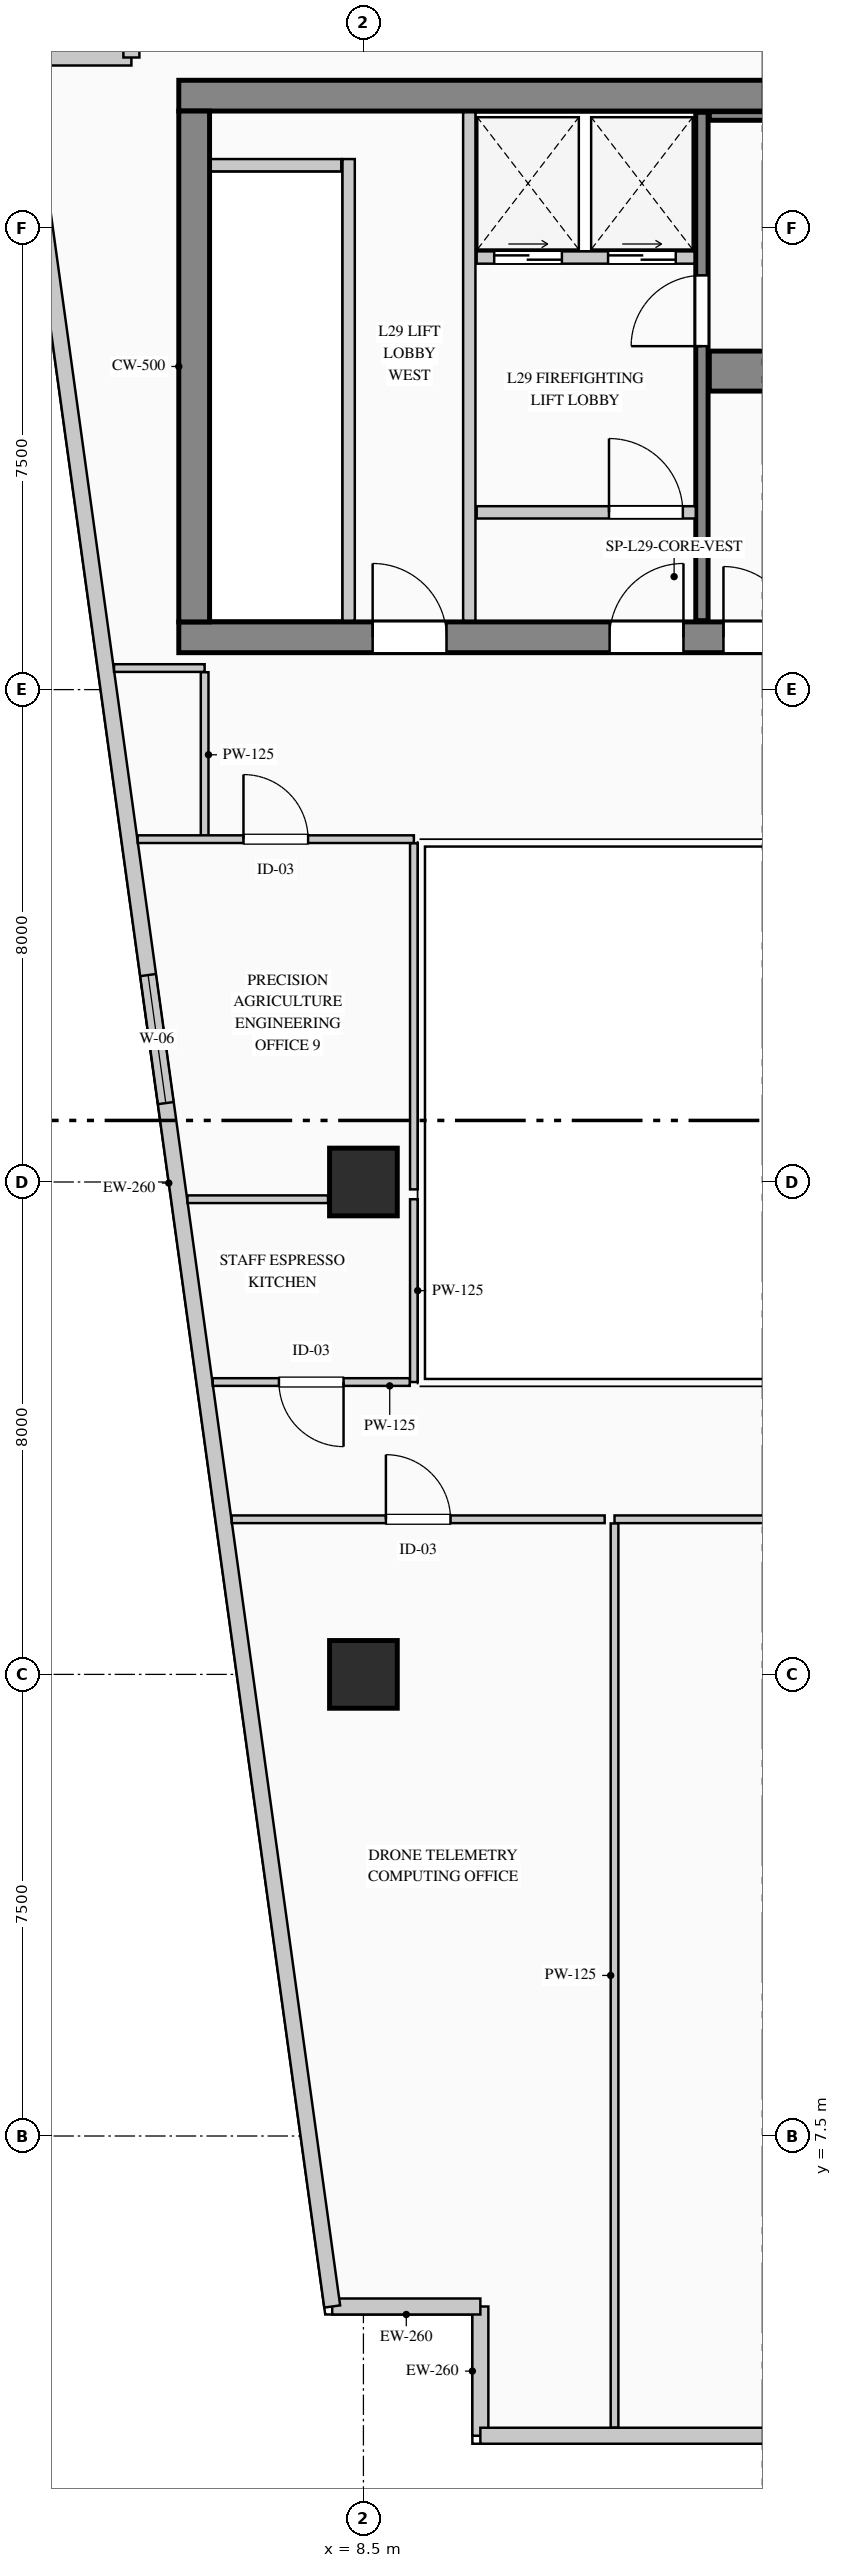
"""IFC4 building model, lengths in metres.
Left out: names, types, materials, properties, quantities, classifications, styles, units other than length and angle.
Written with IfcOpenShell. Run it as: python <this file> out.ifc"""

import sys

from ifc_helpers import new_model, si_unit, direction, frame, frame_2d, origin, origin_2d, place, context, subcontext, project, spatial, rectangle, extrude, element, fill, save


model = new_model("IFC4")
c1 = context("Model", 3, precision=1e-05, world=origin(), true_north=direction((0.0, 1.0)))
c2 = subcontext(c1, "Body", "Model", "MODEL_VIEW")
j1 = project(units=[si_unit("LENGTHUNIT", "METRE"), si_unit("PLANEANGLEUNIT", "RADIAN")], contexts=[c1])
p1 = place(None, origin())
s1 = spatial("IfcSite", under=j1, at=p1, CompositionType="ELEMENT")
p2 = place(p1, origin())
s2 = spatial("IfcBuilding", under=s1, at=p2, CompositionType="ELEMENT")
p3 = place(p2, frame((0.0, 0.0, 127.2)))
s3 = spatial("IfcBuildingStorey", under=s2, at=p3, CompositionType="ELEMENT", Elevation=127.2)
p4 = place(p3, frame((5.5, 40.65, 0.0), z_axis=(0.0, 0.0, 1.0), x_axis=(1.0, 0.0, 0.0)))
e1 = element("IfcWall", 1, at=p4, inside=s3, PredefinedType="SHEAR", context=c2, shape_type="SweptSolid", body=[
    extrude(rectangle(XDim=17.85, YDim=0.5, at=frame_2d((8.925, 0.0))), origin(), (0.0, 0.0, 1.0), 3.95),
])
p5 = place(p4, frame((15.945, 0.0, 0.0)))
e2 = element("IfcOpeningElement", 2, at=p5, cuts=e1, PredefinedType="OPENING", context=c2, shape_type="SweptSolid", body=[
    extrude(rectangle(XDim=1.18, YDim=2.25, at=frame_2d((0.59, 1.125))), frame((0.0, 0.26, 0.0), z_axis=(0.0, -1.0, 0.0), x_axis=(1.0, 0.0, 0.0)), (0.0, 0.0, 1.0), 0.52),
])
p6 = place(p3, frame((5.5, 31.85, 0.0), z_axis=(0.0, 0.0, 1.0), x_axis=(1.0, 0.0, 0.0)))
e3 = element("IfcWall", 3, at=p6, inside=s3, PredefinedType="SHEAR", context=c2, shape_type="SweptSolid", body=[
    extrude(rectangle(XDim=17.85, YDim=0.5, at=frame_2d((8.925, 0.0))), origin(), (0.0, 0.0, 1.0), 3.95),
])
p7 = place(p6, frame((3.15, 0.0, 0.0)))
e4 = element("IfcOpeningElement", 4, at=p7, cuts=e3, PredefinedType="OPENING", context=c2, shape_type="SweptSolid", body=[
    extrude(rectangle(XDim=1.2, YDim=2.2, at=frame_2d((0.6, 1.1))), frame((0.0, 0.26, 0.0), z_axis=(0.0, -1.0, 0.0), x_axis=(1.0, 0.0, 0.0)), (0.0, 0.0, 1.0), 0.52),
])
p8 = place(p6, frame((7.0, 0.0, 0.0)))
e5 = element("IfcOpeningElement", 5, at=p8, cuts=e3, PredefinedType="OPENING", context=c2, shape_type="SweptSolid", body=[
    extrude(rectangle(XDim=1.2, YDim=2.2, at=frame_2d((0.6, 1.1))), frame((0.0, 0.26, 0.0), z_axis=(0.0, -1.0, 0.0), x_axis=(1.0, 0.0, 0.0)), (0.0, 0.0, 1.0), 0.52),
])
p9 = place(p6, frame((8.85, 0.0, 0.0)))
e6 = element("IfcOpeningElement", 6, at=p9, cuts=e3, PredefinedType="OPENING", context=c2, shape_type="SweptSolid", body=[
    extrude(rectangle(XDim=1.15, YDim=2.2, at=frame_2d((0.575, 1.1))), frame((0.0, 0.26, 0.0), z_axis=(0.0, -1.0, 0.0), x_axis=(1.0, 0.0, 0.0)), (0.0, 0.0, 1.0), 0.52),
])
p10 = place(p6, frame((15.95, 0.0, 0.0)))
e7 = element("IfcOpeningElement", 7, at=p10, cuts=e3, PredefinedType="OPENING", context=c2, shape_type="SweptSolid", body=[
    extrude(rectangle(XDim=1.2, YDim=2.2, at=frame_2d((0.6, 1.1))), frame((0.0, 0.26, 0.0), z_axis=(0.0, -1.0, 0.0), x_axis=(1.0, 0.0, 0.0)), (0.0, 0.0, 1.0), 0.52),
])
p11 = place(p3, frame((5.75, 32.1, 0.0), z_axis=(0.0, 0.0, 1.0), x_axis=(0.0, 1.0, 0.0)))
e8 = element("IfcWall", 8, at=p11, inside=s3, PredefinedType="SHEAR", context=c2, shape_type="SweptSolid", body=[
    extrude(rectangle(XDim=8.3, YDim=0.5, at=frame_2d((4.15, 0.0))), origin(), (0.0, 0.0, 1.0), 3.95),
])
p12 = place(p3, frame((14.0, 32.12, 0.0), z_axis=(0.0, 0.0, 1.0), x_axis=(0.0, 1.0, 0.0)))
e9 = element("IfcWall", 9, at=p12, inside=s3, PredefinedType="SHEAR", context=c2, shape_type="SweptSolid", body=[
    extrude(rectangle(XDim=8.26, YDim=0.2, at=frame_2d((4.13, 0.0))), origin(), (0.0, 0.0, 1.0), 3.95),
])
p13 = place(p12, frame((4.46, 0.0, 0.0)))
e10 = element("IfcOpeningElement", 10, at=p13, cuts=e9, PredefinedType="OPENING", context=c2, shape_type="SweptSolid", body=[
    extrude(rectangle(XDim=1.15, YDim=2.2, at=frame_2d((0.575, 1.1))), frame((0.0, 0.11, 0.0), z_axis=(0.0, -1.0, 0.0), x_axis=(1.0, 0.0, 0.0)), (0.0, 0.0, 1.0), 0.22),
])
p14 = place(p3, frame((14.12, 36.175, 0.0), z_axis=(0.0, 0.0, 1.0), x_axis=(1.0, 0.0, 0.0)))
e11 = element("IfcWall", 11, at=p14, inside=s3, PredefinedType="SHEAR", context=c2, shape_type="SweptSolid", body=[
    extrude(rectangle(XDim=7.01, YDim=0.65, at=frame_2d((3.505, 0.0))), origin(), (0.0, 0.0, 1.0), 3.95),
])
p15 = place(p3, frame((14.12, 40.32, 0.0), z_axis=(0.0, 0.0, 1.0), x_axis=(1.0, 0.0, 0.0)))
e12 = element("IfcWall", 12, at=p15, inside=s3, PredefinedType="SHEAR", context=c2, shape_type="SweptSolid", body=[
    extrude(rectangle(XDim=7.01, YDim=0.14, at=frame_2d((3.505, 0.0))), origin(), (0.0, 0.0, 1.0), 3.95),
])
for number, where, z_axis, x_axis in (
    (13, (8.5, 15.0, 0.0), (0.0, 0.0, 1.0), (1.0, 0.0, 0.0)),
    (14, (8.5, 23.0, 0.0), (0.0, 0.0, 1.0), (1.0, 0.0, 0.0)),
):
    element("IfcColumn", number, at=place(p3, frame(where, z_axis=z_axis, x_axis=x_axis)), inside=s3, PredefinedType="COLUMN", context=c2, shape_type="SweptSolid", body=[
        extrude(rectangle(XDim=1.1, YDim=1.1, at=origin_2d()), origin(), (0.0, 0.0, 1.0), 3.95),
    ])
p16 = place(p3, frame((10.4, 2.63, 0.0), z_axis=(0.0, 0.0, 1.0), x_axis=(0.0, 1.0, 0.0)))
e15 = element("IfcWall", 15, at=p16, inside=s3, PredefinedType="STANDARD", context=c2, shape_type="SweptSolid", body=[
    extrude(rectangle(XDim=2.1, YDim=0.26, at=frame_2d((1.05, 0.0))), origin(), (0.0, 0.0, 1.0), 3.69),
])
p17 = place(p3, frame((10.4, 4.73, 0.0), z_axis=(0.0, 0.0, 1.0), x_axis=(-1.0, 0.0, 0.0)))
e16 = element("IfcWall", 16, at=p17, inside=s3, PredefinedType="STANDARD", context=c2, shape_type="SweptSolid", body=[
    extrude(rectangle(XDim=2.407, YDim=0.26, at=frame_2d((1.204, 0.0))), origin(), (0.0, 0.0, 1.0), 3.69),
])
p18 = place(p3, frame((7.993, 4.73, 0.0), z_axis=(0.0, 0.0, 1.0), x_axis=(-0.136989009016, 0.990572567462, 0.0)))
e17 = element("IfcWall", 17, at=p18, inside=s3, PredefinedType="STANDARD", context=c2, shape_type="SweptSolid", body=[
    extrude(rectangle(XDim=36.888, YDim=0.26, at=frame_2d((18.444, 0.0))), origin(), (0.0, 0.0, 1.0), 3.69),
])
p19 = place(p18, frame((19.738, 0.0, 0.9)))
e18 = element("IfcOpeningElement", 18, at=p19, cuts=e17, PredefinedType="OPENING", context=c2, shape_type="SweptSolid", body=[
    extrude(rectangle(XDim=2.1, YDim=2.0, at=frame_2d((1.05, 1.0))), frame((0.0, 0.14, 0.0), z_axis=(0.0, -1.0, 0.0), x_axis=(1.0, 0.0, 0.0)), (0.0, 0.0, 1.0), 0.28),
])
p20 = place(p3, frame((2.94, 41.27, 0.0), z_axis=(0.0, 0.0, 1.0), x_axis=(1.0, 0.0, 0.0)))
e19 = element("IfcWall", 19, at=p20, inside=s3, PredefinedType="STANDARD", context=c2, shape_type="SweptSolid", body=[
    extrude(rectangle(XDim=1.79, YDim=0.26, at=frame_2d((0.895, 0.0))), origin(), (0.0, 0.0, 1.0), 3.69),
])
p21 = place(p3, frame((4.73, 41.27, 0.0), z_axis=(0.0, 0.0, 1.0), x_axis=(0.0, 1.0, 0.0)))
e20 = element("IfcWall", 20, at=p21, inside=s3, PredefinedType="STANDARD", context=c2, shape_type="SweptSolid", body=[
    extrude(rectangle(XDim=2.1, YDim=0.26, at=frame_2d((1.05, 0.0))), origin(), (0.0, 0.0, 1.0), 3.69),
])
p22 = place(p3, frame((24.11, 2.63, 0.0), z_axis=(0.0, 0.0, 1.0), x_axis=(-1.0, 0.0, 0.0)))
e21 = element("IfcWall", 21, at=p22, inside=s3, PredefinedType="STANDARD", context=c2, shape_type="SweptSolid", body=[
    extrude(rectangle(XDim=13.71, YDim=0.26, at=frame_2d((6.855, 0.0))), origin(), (0.0, 0.0, 1.0), 3.69),
])
p23 = place(p22, frame((3.886, 0.0, 0.9)))
e22 = element("IfcOpeningElement", 22, at=p23, cuts=e21, PredefinedType="OPENING", context=c2, shape_type="SweptSolid", body=[
    extrude(rectangle(XDim=2.1, YDim=2.0, at=frame_2d((1.05, 1.0))), frame((0.0, 0.14, 0.0), z_axis=(0.0, -1.0, 0.0), x_axis=(1.0, 0.0, 0.0)), (0.0, 0.0, 1.0), 0.28),
])
p24 = place(p3, frame((8.26, 32.12, 0.0), z_axis=(0.0, 0.0, 1.0), x_axis=(0.0, 1.0, 0.0)))
e23 = element("IfcWall", 23, at=p24, inside=s3, PredefinedType="PARTITIONING", context=c2, shape_type="SweptSolid", body=[
    extrude(rectangle(XDim=7.5, YDim=0.2, at=frame_2d((3.75, 0.0))), origin(), (0.0, 0.0, 1.0), 3.69),
])
p25 = place(p3, frame((6.02, 39.52, 0.0), z_axis=(0.0, 0.0, 1.0), x_axis=(1.0, 0.0, 0.0)))
e24 = element("IfcWall", 24, at=p25, inside=s3, PredefinedType="PARTITIONING", context=c2, shape_type="SweptSolid", body=[
    extrude(rectangle(XDim=2.12, YDim=0.2, at=frame_2d((1.06, 0.0))), origin(), (0.0, 0.0, 1.0), 3.69),
])
p26 = place(p3, frame((10.22, 32.12, 0.0), z_axis=(0.0, 0.0, 1.0), x_axis=(0.0, 1.0, 0.0)))
e25 = element("IfcWall", 25, at=p26, inside=s3, PredefinedType="PARTITIONING", context=c2, shape_type="SweptSolid", body=[
    extrude(rectangle(XDim=8.26, YDim=0.2, at=frame_2d((4.13, 0.0))), origin(), (0.0, 0.0, 1.0), 3.69),
])
p27 = place(p3, frame((10.34, 38.02, 0.0), z_axis=(0.0, 0.0, 1.0), x_axis=(1.0, 0.0, 0.0)))
e26 = element("IfcWall", 26, at=p27, inside=s3, PredefinedType="PARTITIONING", context=c2, shape_type="SweptSolid", body=[
    extrude(rectangle(XDim=3.54, YDim=0.2, at=frame_2d((1.77, 0.0))), origin(), (0.0, 0.0, 1.0), 3.69),
])
p28 = place(p27, frame((0.285, 0.0, 0.0)))
e27 = element("IfcOpeningElement", 27, at=p28, cuts=e26, PredefinedType="OPENING", context=c2, shape_type="SweptSolid", body=[
    extrude(rectangle(XDim=1.1, YDim=2.2, at=frame_2d((0.55, 1.1))), frame((0.0, 0.11, 0.0), z_axis=(0.0, -1.0, 0.0), x_axis=(1.0, 0.0, 0.0)), (0.0, 0.0, 1.0), 0.22),
])
p29 = place(p27, frame((2.135, 0.0, 0.0)))
e28 = element("IfcOpeningElement", 28, at=p29, cuts=e26, PredefinedType="OPENING", context=c2, shape_type="SweptSolid", body=[
    extrude(rectangle(XDim=1.1, YDim=2.2, at=frame_2d((0.55, 1.1))), frame((0.0, 0.11, 0.0), z_axis=(0.0, -1.0, 0.0), x_axis=(1.0, 0.0, 0.0)), (0.0, 0.0, 1.0), 0.22),
])
p30 = place(p3, frame((10.34, 33.88, 0.0), z_axis=(0.0, 0.0, 1.0), x_axis=(1.0, 0.0, 0.0)))
e29 = element("IfcWall", 29, at=p30, inside=s3, PredefinedType="PARTITIONING", context=c2, shape_type="SweptSolid", body=[
    extrude(rectangle(XDim=3.56, YDim=0.2, at=frame_2d((1.78, 0.0))), origin(), (0.0, 0.0, 1.0), 3.69),
])
p31 = place(p30, frame((2.15, 0.0, 0.0)))
e30 = element("IfcOpeningElement", 30, at=p31, cuts=e29, PredefinedType="OPENING", context=c2, shape_type="SweptSolid", body=[
    extrude(rectangle(XDim=1.2, YDim=2.2, at=frame_2d((0.6, 1.1))), frame((0.0, 0.11, 0.0), z_axis=(0.0, -1.0, 0.0), x_axis=(1.0, 0.0, 0.0)), (0.0, 0.0, 1.0), 0.22),
])
p32 = place(p3, frame((12.58, 17.52, 0.0), z_axis=(0.0, 0.0, 1.0), x_axis=(1.0, 0.0, 0.0)))
e31 = element("IfcWall", 31, at=p32, inside=s3, PredefinedType="PARTITIONING", context=c2, shape_type="SweptSolid", body=[
    extrude(rectangle(XDim=10.84, YDim=0.125, at=frame_2d((5.42, 0.0))), origin(), (0.0, 0.0, 1.0), 3.69),
])
p33 = place(p32, frame((4.895, 0.0, 0.0)))
e32 = element("IfcOpeningElement", 32, at=p33, cuts=e31, PredefinedType="OPENING", context=c2, shape_type="SweptSolid", body=[
    extrude(rectangle(XDim=1.05, YDim=2.15, at=frame_2d((0.525, 1.075))), frame((0.0, 0.073, 0.0), z_axis=(0.0, -1.0, 0.0), x_axis=(1.0, 0.0, 0.0)), (0.0, 0.0, 1.0), 0.145),
])
p34 = place(p3, frame((12.58, 2.765, 0.0), z_axis=(0.0, 0.0, 1.0), x_axis=(0.0, 1.0, 0.0)))
e33 = element("IfcWall", 33, at=p34, inside=s3, PredefinedType="PARTITIONING", context=c2, shape_type="SweptSolid", body=[
    extrude(rectangle(XDim=14.688, YDim=0.125, at=frame_2d((7.344, 0.0))), origin(), (0.0, 0.0, 1.0), 3.69),
])
p35 = place(p3, frame((6.36, 17.52, 0.0), z_axis=(0.0, 0.0, 1.0), x_axis=(1.0, 0.0, 0.0)))
e34 = element("IfcWall", 34, at=p35, inside=s3, PredefinedType="PARTITIONING", context=c2, shape_type="SweptSolid", body=[
    extrude(rectangle(XDim=6.06, YDim=0.125, at=frame_2d((3.03, 0.0))), origin(), (0.0, 0.0, 1.0), 3.69),
])
p36 = place(p35, frame((2.505, 0.0, 0.0)))
e35 = element("IfcOpeningElement", 35, at=p36, cuts=e34, PredefinedType="OPENING", context=c2, shape_type="SweptSolid", body=[
    extrude(rectangle(XDim=1.05, YDim=2.15, at=frame_2d((0.525, 1.075))), frame((0.0, 0.073, 0.0), z_axis=(0.0, -1.0, 0.0), x_axis=(1.0, 0.0, 0.0)), (0.0, 0.0, 1.0), 0.145),
])
p37 = place(p3, frame((9.32, 22.72, 0.0), z_axis=(0.0, 0.0, 1.0), x_axis=(0.0, -1.0, 0.0)))
e36 = element("IfcWall", 36, at=p37, inside=s3, PredefinedType="PARTITIONING", context=c2, shape_type="SweptSolid", body=[
    extrude(rectangle(XDim=2.97, YDim=0.125, at=frame_2d((1.485, 0.0))), origin(), (0.0, 0.0, 1.0), 3.375),
])
p38 = place(p3, frame((9.252, 19.75, 0.0), z_axis=(0.0, 0.0, 1.0), x_axis=(-1.0, 0.0, 0.0)))
e37 = element("IfcWall", 37, at=p38, inside=s3, PredefinedType="PARTITIONING", context=c2, shape_type="SweptSolid", body=[
    extrude(rectangle(XDim=3.2, YDim=0.125, at=frame_2d((1.6, 0.0))), origin(), (0.0, 0.0, 1.0), 3.69),
])
p39 = place(p38, frame((1.075, 0.0, 0.0)))
e38 = element("IfcOpeningElement", 38, at=p39, cuts=e37, PredefinedType="OPENING", context=c2, shape_type="SweptSolid", body=[
    extrude(rectangle(XDim=1.05, YDim=2.15, at=frame_2d((0.525, 1.075))), frame((0.0, 0.073, 0.0), z_axis=(0.0, -1.0, 0.0), x_axis=(1.0, 0.0, 0.0)), (0.0, 0.0, 1.0), 0.145),
])
p40 = place(p3, frame((5.641, 22.72, 0.0), z_axis=(0.0, 0.0, 1.0), x_axis=(1.0, 0.0, 0.0)))
e39 = element("IfcWall", 39, at=p40, inside=s3, PredefinedType="PARTITIONING", context=c2, shape_type="SweptSolid", body=[
    extrude(rectangle(XDim=2.284, YDim=0.125, at=frame_2d((1.142, 0.0))), origin(), (0.0, 0.0, 1.0), 3.69),
])
p41 = place(p3, frame((4.448, 31.35, 0.0), z_axis=(0.0, 0.0, 1.0), x_axis=(1.0, 0.0, 0.0)))
e40 = element("IfcWall", 40, at=p41, inside=s3, PredefinedType="PARTITIONING", context=c2, shape_type="SweptSolid", body=[
    extrude(rectangle(XDim=1.472, YDim=0.125, at=frame_2d((0.736, 0.0))), origin(), (0.0, 0.0, 1.0), 3.69),
])
p42 = place(p3, frame((5.92, 31.282, 0.0), z_axis=(0.0, 0.0, 1.0), x_axis=(0.0, -1.0, 0.0)))
e41 = element("IfcWall", 41, at=p42, inside=s3, PredefinedType="PARTITIONING", context=c2, shape_type="SweptSolid", body=[
    extrude(rectangle(XDim=2.682, YDim=0.125, at=frame_2d((1.341, 0.0))), origin(), (0.0, 0.0, 1.0), 3.69),
])
p43 = place(p3, frame((4.832, 28.57, 0.0), z_axis=(0.0, 0.0, 1.0), x_axis=(1.0, 0.0, 0.0)))
e42 = element("IfcWall", 42, at=p43, inside=s3, PredefinedType="PARTITIONING", context=c2, shape_type="SweptSolid", body=[
    extrude(rectangle(XDim=4.488, YDim=0.125, at=frame_2d((2.244, 0.0))), origin(), (0.0, 0.0, 1.0), 3.69),
])
p44 = place(p43, frame((1.719, 0.0, 0.0)))
e43 = element("IfcOpeningElement", 43, at=p44, cuts=e42, PredefinedType="OPENING", context=c2, shape_type="SweptSolid", body=[
    extrude(rectangle(XDim=1.05, YDim=2.15, at=frame_2d((0.525, 1.075))), frame((0.0, 0.073, 0.0), z_axis=(0.0, -1.0, 0.0), x_axis=(1.0, 0.0, 0.0)), (0.0, 0.0, 1.0), 0.145),
])
p45 = place(p3, frame((9.32, 28.502, 0.0), z_axis=(0.0, 0.0, 1.0), x_axis=(0.0, -1.0, 0.0)))
e44 = element("IfcWall", 44, at=p45, inside=s3, PredefinedType="PARTITIONING", context=c2, shape_type="SweptSolid", body=[
    extrude(rectangle(XDim=5.623, YDim=0.125, at=frame_2d((2.811, 0.0))), origin(), (0.0, 0.0, 1.0), 3.375),
])
p46 = place(p19, origin())
e45 = element("IfcWindow", 45, at=p46, inside=s3, PartitioningType="DOUBLE_PANEL_VERTICAL", PredefinedType="WINDOW", context=c2, shape_type="SweptSolid", body=[
    extrude(rectangle(XDim=2.1, YDim=2.0, at=frame_2d((1.05, 1.0))), frame((0.0, 0.03, 0.0), z_axis=(0.0, -1.0, 0.0), x_axis=(1.0, 0.0, 0.0)), (0.0, 0.0, 1.0), 0.06),
])
fill(e18, e45)
p47 = place(p7, origin())
e46 = element("IfcDoor", 46, at=p47, inside=s3, OperationType="SINGLE_SWING_LEFT", PredefinedType="DOOR", context=c2, shape_type="SweptSolid", body=[
    extrude(rectangle(XDim=1.2, YDim=2.2, at=frame_2d((0.6, 1.1))), frame((0.0, 0.025, 0.0), z_axis=(0.0, -1.0, 0.0), x_axis=(1.0, 0.0, 0.0)), (0.0, 0.0, 1.0), 0.05),
])
fill(e4, e46)
p48 = place(p8, origin())
e47 = element("IfcDoor", 47, at=p48, inside=s3, OperationType="SINGLE_SWING_RIGHT", PredefinedType="DOOR", context=c2, shape_type="SweptSolid", body=[
    extrude(rectangle(XDim=1.2, YDim=2.2, at=frame_2d((0.6, 1.1))), frame((0.0, 0.025, 0.0), z_axis=(0.0, -1.0, 0.0), x_axis=(1.0, 0.0, 0.0)), (0.0, 0.0, 1.0), 0.05),
])
fill(e5, e47)
p49 = place(p9, origin())
e48 = element("IfcDoor", 48, at=p49, inside=s3, OperationType="SINGLE_SWING_LEFT", PredefinedType="DOOR", context=c2, shape_type="SweptSolid", body=[
    extrude(rectangle(XDim=1.15, YDim=2.2, at=frame_2d((0.575, 1.1))), frame((0.0, 0.025, 0.0), z_axis=(0.0, -1.0, 0.0), x_axis=(1.0, 0.0, 0.0)), (0.0, 0.0, 1.0), 0.05),
])
fill(e6, e48)
p50 = place(p31, origin())
e49 = element("IfcDoor", 49, at=p50, inside=s3, OperationType="SINGLE_SWING_LEFT", PredefinedType="DOOR", context=c2, shape_type="SweptSolid", body=[
    extrude(rectangle(XDim=1.2, YDim=2.2, at=frame_2d((0.6, 1.1))), frame((0.0, 0.025, 0.0), z_axis=(0.0, -1.0, 0.0), x_axis=(1.0, 0.0, 0.0)), (0.0, 0.0, 1.0), 0.05),
])
fill(e30, e49)
p51 = place(p13, origin())
e50 = element("IfcDoor", 50, at=p51, inside=s3, OperationType="SINGLE_SWING_LEFT", PredefinedType="DOOR", context=c2, shape_type="SweptSolid", body=[
    extrude(rectangle(XDim=1.15, YDim=2.2, at=frame_2d((0.575, 1.1))), frame((0.0, 0.025, 0.0), z_axis=(0.0, -1.0, 0.0), x_axis=(1.0, 0.0, 0.0)), (0.0, 0.0, 1.0), 0.05),
])
fill(e10, e50)
p52 = place(p28, origin())
e51 = element("IfcDoor", 51, at=p52, inside=s3, OperationType="DOUBLE_DOOR_SLIDING", PredefinedType="DOOR", context=c2, shape_type="SweptSolid", body=[
    extrude(rectangle(XDim=1.1, YDim=2.2, at=frame_2d((0.55, 1.1))), frame((0.0, 0.025, 0.0), z_axis=(0.0, -1.0, 0.0), x_axis=(1.0, 0.0, 0.0)), (0.0, 0.0, 1.0), 0.05),
])
fill(e27, e51)
p53 = place(p29, origin())
e52 = element("IfcDoor", 52, at=p53, inside=s3, OperationType="DOUBLE_DOOR_SLIDING", PredefinedType="DOOR", context=c2, shape_type="SweptSolid", body=[
    extrude(rectangle(XDim=1.1, YDim=2.2, at=frame_2d((0.55, 1.1))), frame((0.0, 0.025, 0.0), z_axis=(0.0, -1.0, 0.0), x_axis=(1.0, 0.0, 0.0)), (0.0, 0.0, 1.0), 0.05),
])
fill(e28, e52)
p54 = place(p36, origin())
e53 = element("IfcDoor", 53, at=p54, inside=s3, OperationType="SINGLE_SWING_LEFT", PredefinedType="DOOR", context=c2, shape_type="SweptSolid", body=[
    extrude(rectangle(XDim=1.05, YDim=2.15, at=frame_2d((0.525, 1.075))), frame((0.0, 0.025, 0.0), z_axis=(0.0, -1.0, 0.0), x_axis=(1.0, 0.0, 0.0)), (0.0, 0.0, 1.0), 0.05),
])
fill(e35, e53)
p55 = place(p39, origin())
e54 = element("IfcDoor", 54, at=p55, inside=s3, OperationType="SINGLE_SWING_LEFT", PredefinedType="DOOR", context=c2, shape_type="SweptSolid", body=[
    extrude(rectangle(XDim=1.05, YDim=2.15, at=frame_2d((0.525, 1.075))), frame((0.0, 0.025, 0.0), z_axis=(0.0, -1.0, 0.0), x_axis=(1.0, 0.0, 0.0)), (0.0, 0.0, 1.0), 0.05),
])
fill(e38, e54)
p56 = place(p44, origin())
e55 = element("IfcDoor", 55, at=p56, inside=s3, OperationType="SINGLE_SWING_LEFT", PredefinedType="DOOR", context=c2, shape_type="SweptSolid", body=[
    extrude(rectangle(XDim=1.05, YDim=2.15, at=frame_2d((0.525, 1.075))), frame((0.0, 0.025, 0.0), z_axis=(0.0, -1.0, 0.0), x_axis=(1.0, 0.0, 0.0)), (0.0, 0.0, 1.0), 0.05),
])
fill(e43, e55)
save(model, sys.argv[1])
